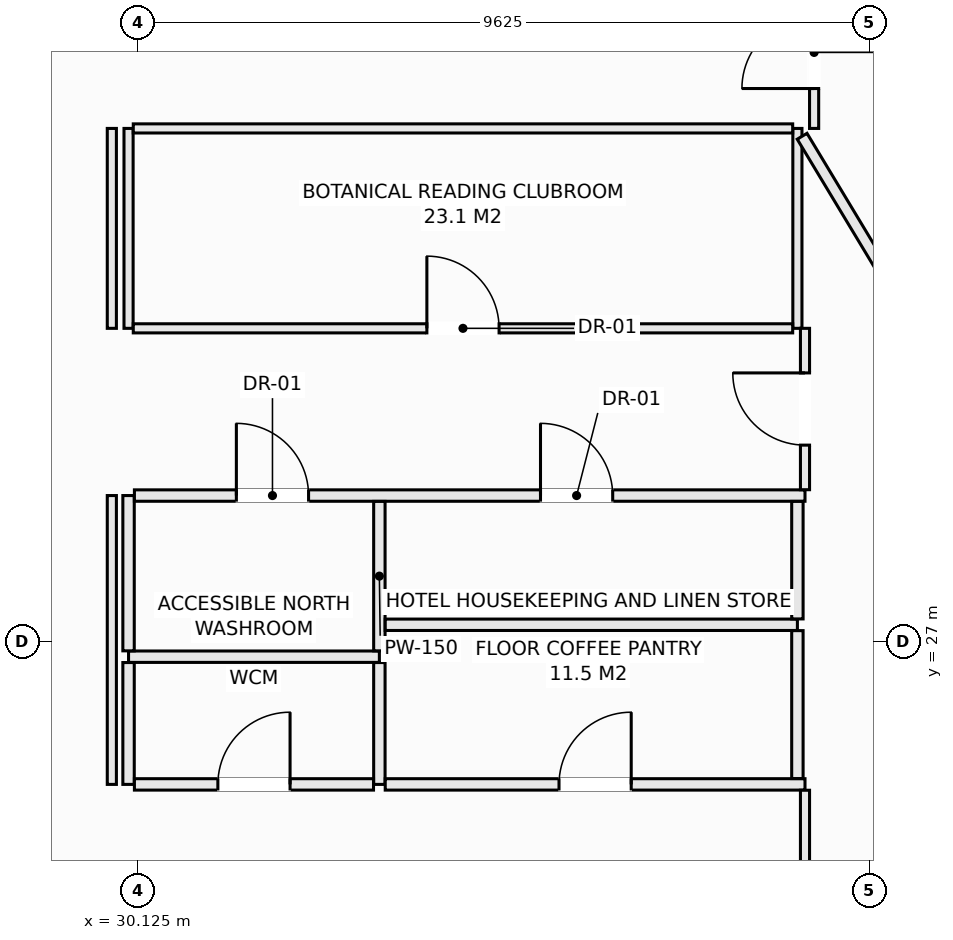
"""IFC4 building model, lengths in metres.
Left out: names, types, materials, properties, quantities, classifications, styles, units other than length and angle.
Written with IfcOpenShell. Run it as: python <this file> out.ifc"""

import sys

from ifc_helpers import new_model, si_unit, direction, frame, frame_2d, origin, place, context, subcontext, project, spatial, rectangle, extrude, element, fill, save


model = new_model("IFC4")
c1 = context("Model", 3, precision=1e-05, world=origin(), true_north=direction((0.0, 1.0)))
c2 = subcontext(c1, "Body", "Model", "MODEL_VIEW")
j1 = project(units=[si_unit("LENGTHUNIT", "METRE"), si_unit("PLANEANGLEUNIT", "RADIAN")], contexts=[c1])
p1 = place(None, origin())
s1 = spatial("IfcSite", under=j1, at=p1, CompositionType="ELEMENT")
p2 = place(p1, origin())
s2 = spatial("IfcBuilding", under=s1, at=p2, CompositionType="ELEMENT")
p3 = place(p2, frame((0.0, 0.0, 139.3)))
s3 = spatial("IfcBuildingStorey", under=s2, at=p3, CompositionType="ELEMENT", Elevation=139.3)
p4 = place(p3, frame((30.0, 26.8, 0.0), z_axis=(0.0, 0.0, 1.0), x_axis=(1.0, 0.0, 0.0)))
e1 = element("IfcWall", 1, at=p4, inside=s3, PredefinedType="PARTITIONING", context=c2, shape_type="SweptSolid", body=[
    extrude(rectangle(XDim=3.3, YDim=0.15, at=frame_2d((1.65, 0.0))), origin(), (0.0, 0.0, 1.0), 3.13),
])
p5 = place(p3, frame((30.0, 25.12, 0.0), z_axis=(0.0, 0.0, 1.0), x_axis=(0.0, 1.0, 0.0)))
e2 = element("IfcWall", 2, at=p5, inside=s3, PredefinedType="PARTITIONING", context=c2, shape_type="SweptSolid", body=[
    extrude(rectangle(XDim=1.603, YDim=0.15, at=frame_2d((0.801, 0.0))), origin(), (0.0, 0.0, 1.0), 3.13),
])
p6 = place(p3, frame((30.0, 26.877, 0.0), z_axis=(0.0, 0.0, 1.0), x_axis=(0.0, 1.0, 0.0)))
e3 = element("IfcWall", 3, at=p6, inside=s3, PredefinedType="PARTITIONING", context=c2, shape_type="SweptSolid", body=[
    extrude(rectangle(XDim=2.043, YDim=0.15, at=frame_2d((1.021, 0.0))), origin(), (0.0, 0.0, 1.0), 3.13),
])
p7 = place(p3, frame((30.0, 31.12, 0.0), z_axis=(0.0, 0.0, 1.0), x_axis=(0.0, 1.0, 0.0)))
e4 = element("IfcWall", 4, at=p7, inside=s3, PredefinedType="PARTITIONING", context=c2, shape_type="SweptSolid", body=[
    extrude(rectangle(XDim=2.63, YDim=0.12, at=frame_2d((1.315, 0.0))), origin(), (0.0, 0.0, 1.0), 3.13),
])
p8 = place(p3, frame((30.077, 28.92, 0.0), z_axis=(0.0, 0.0, 1.0), x_axis=(1.0, 0.0, 0.0)))
e5 = element("IfcWall", 5, at=p8, inside=s3, PredefinedType="PARTITIONING", context=c2, shape_type="SweptSolid", body=[
    extrude(rectangle(XDim=8.823, YDim=0.15, at=frame_2d((4.412, 0.0))), origin(), (0.0, 0.0, 1.0), 3.13),
])
p9 = place(p8, frame((1.342, 0.0, 0.0)))
e6 = element("IfcOpeningElement", 6, at=p9, cuts=e5, PredefinedType="OPENING", context=c2, shape_type="SweptSolid", body=[
    extrude(rectangle(XDim=0.95, YDim=2.1, at=frame_2d((0.475, 1.05))), frame((0.0, 0.085, 0.0), z_axis=(0.0, -1.0, 0.0), x_axis=(1.0, 0.0, 0.0)), (0.0, 0.0, 1.0), 0.17),
])
p10 = place(p8, frame((5.343, 0.0, 0.0)))
e7 = element("IfcOpeningElement", 7, at=p10, cuts=e5, PredefinedType="OPENING", context=c2, shape_type="SweptSolid", body=[
    extrude(rectangle(XDim=0.95, YDim=2.1, at=frame_2d((0.475, 1.05))), frame((0.0, 0.085, 0.0), z_axis=(0.0, -1.0, 0.0), x_axis=(1.0, 0.0, 0.0)), (0.0, 0.0, 1.0), 0.17),
])
p11 = place(p3, frame((33.3, 25.12, 0.0), z_axis=(0.0, 0.0, 1.0), x_axis=(0.0, 1.0, 0.0)))
e8 = element("IfcWall", 8, at=p11, inside=s3, PredefinedType="PARTITIONING", context=c2, shape_type="SweptSolid", body=[
    extrude(rectangle(XDim=1.603, YDim=0.15, at=frame_2d((0.801, 0.0))), origin(), (0.0, 0.0, 1.0), 3.13),
])
p12 = place(p3, frame((33.3, 26.877, 0.0), z_axis=(0.0, 0.0, 1.0), x_axis=(0.0, 1.0, 0.0)))
e9 = element("IfcWall", 9, at=p12, inside=s3, PredefinedType="PARTITIONING", context=c2, shape_type="SweptSolid", body=[
    extrude(rectangle(XDim=1.966, YDim=0.15, at=frame_2d((0.983, 0.0))), origin(), (0.0, 0.0, 1.0), 3.13),
])
p13 = place(p3, frame((30.077, 25.12, 0.0), z_axis=(0.0, 0.0, 1.0), x_axis=(1.0, 0.0, 0.0)))
e10 = element("IfcWall", 10, at=p13, inside=s3, PredefinedType="PARTITIONING", context=c2, shape_type="SweptSolid", body=[
    extrude(rectangle(XDim=3.146, YDim=0.15, at=frame_2d((1.573, 0.0))), origin(), (0.0, 0.0, 1.0), 3.13),
])
p14 = place(p13, frame((1.098, 0.0, 0.0)))
e11 = element("IfcOpeningElement", 11, at=p14, cuts=e10, PredefinedType="OPENING", context=c2, shape_type="SweptSolid", body=[
    extrude(rectangle(XDim=0.95, YDim=2.1, at=frame_2d((0.475, 1.05))), frame((0.0, 0.085, 0.0), z_axis=(0.0, -1.0, 0.0), x_axis=(1.0, 0.0, 0.0)), (0.0, 0.0, 1.0), 0.17),
])
p15 = place(p3, frame((33.377, 25.12, 0.0), z_axis=(0.0, 0.0, 1.0), x_axis=(1.0, 0.0, 0.0)))
e12 = element("IfcWall", 12, at=p15, inside=s3, PredefinedType="PARTITIONING", context=c2, shape_type="SweptSolid", body=[
    extrude(rectangle(XDim=5.523, YDim=0.15, at=frame_2d((2.761, 0.0))), origin(), (0.0, 0.0, 1.0), 3.13),
])
p16 = place(p15, frame((2.287, 0.0, 0.0)))
e13 = element("IfcOpeningElement", 13, at=p16, cuts=e12, PredefinedType="OPENING", context=c2, shape_type="SweptSolid", body=[
    extrude(rectangle(XDim=0.95, YDim=2.1, at=frame_2d((0.475, 1.05))), frame((0.0, 0.085, 0.0), z_axis=(0.0, -1.0, 0.0), x_axis=(1.0, 0.0, 0.0)), (0.0, 0.0, 1.0), 0.17),
])
p17 = place(p3, frame((33.377, 27.22, 0.0), z_axis=(0.0, 0.0, 1.0), x_axis=(1.0, 0.0, 0.0)))
e14 = element("IfcWall", 14, at=p17, inside=s3, PredefinedType="PARTITIONING", context=c2, shape_type="SweptSolid", body=[
    extrude(rectangle(XDim=5.423, YDim=0.15, at=frame_2d((2.711, 0.0))), origin(), (0.0, 0.0, 1.0), 3.13),
])
p18 = place(p3, frame((38.8, 25.197, 0.0), z_axis=(0.0, 0.0, 1.0), x_axis=(0.0, 1.0, 0.0)))
e15 = element("IfcWall", 15, at=p18, inside=s3, PredefinedType="PARTITIONING", context=c2, shape_type="SweptSolid", body=[
    extrude(rectangle(XDim=1.946, YDim=0.15, at=frame_2d((0.973, 0.0))), origin(), (0.0, 0.0, 1.0), 3.13),
])
p19 = place(p3, frame((38.8, 27.297, 0.0), z_axis=(0.0, 0.0, 1.0), x_axis=(0.0, 1.0, 0.0)))
e16 = element("IfcWall", 16, at=p19, inside=s3, PredefinedType="PARTITIONING", context=c2, shape_type="SweptSolid", body=[
    extrude(rectangle(XDim=1.546, YDim=0.15, at=frame_2d((0.773, 0.0))), origin(), (0.0, 0.0, 1.0), 3.13),
])
p20 = place(p3, frame((38.8, 31.12, 0.0), z_axis=(0.0, 0.0, 1.0), x_axis=(0.0, 1.0, 0.0)))
e17 = element("IfcWall", 17, at=p20, inside=s3, PredefinedType="PARTITIONING", context=c2, shape_type="SweptSolid", body=[
    extrude(rectangle(XDim=2.63, YDim=0.12, at=frame_2d((1.315, 0.0))), origin(), (0.0, 0.0, 1.0), 3.13),
])
p21 = place(p3, frame((30.062, 31.12, 0.0), z_axis=(0.0, 0.0, 1.0), x_axis=(1.0, 0.0, 0.0)))
e18 = element("IfcWall", 18, at=p21, inside=s3, PredefinedType="PARTITIONING", context=c2, shape_type="SweptSolid", body=[
    extrude(rectangle(XDim=8.676, YDim=0.12, at=frame_2d((4.338, 0.0))), origin(), (0.0, 0.0, 1.0), 3.13),
])
p22 = place(p21, frame((3.863, 0.0, 0.0)))
e19 = element("IfcOpeningElement", 19, at=p22, cuts=e18, PredefinedType="OPENING", context=c2, shape_type="SweptSolid", body=[
    extrude(rectangle(XDim=0.95, YDim=2.1, at=frame_2d((0.475, 1.05))), frame((0.0, 0.07, 0.0), z_axis=(0.0, -1.0, 0.0), x_axis=(1.0, 0.0, 0.0)), (0.0, 0.0, 1.0), 0.14),
])
p23 = place(p3, frame((30.062, 33.75, 0.0), z_axis=(0.0, 0.0, 1.0), x_axis=(1.0, 0.0, 0.0)))
e20 = element("IfcWall", 20, at=p23, inside=s3, PredefinedType="PARTITIONING", context=c2, shape_type="SweptSolid", body=[
    extrude(rectangle(XDim=8.676, YDim=0.12, at=frame_2d((4.338, 0.0))), origin(), (0.0, 0.0, 1.0), 3.13),
])
p24 = place(p3, frame((39.02, 33.75, 0.0), z_axis=(0.0, 0.0, 1.0), x_axis=(0.0, 1.0, 0.0)))
e21 = element("IfcWall", 21, at=p24, inside=s3, PredefinedType="PARTITIONING", context=c2, shape_type="SweptSolid", body=[
    extrude(rectangle(XDim=2.0, YDim=0.12, at=frame_2d((1.0, 0.0))), origin(), (0.0, 0.0, 1.0), 3.13),
])
p25 = place(p24, frame((0.525, 0.0, 0.0)))
e22 = element("IfcOpeningElement", 22, at=p25, cuts=e21, PredefinedType="OPENING", context=c2, shape_type="SweptSolid", body=[
    extrude(rectangle(XDim=0.95, YDim=2.1, at=frame_2d((0.475, 1.05))), frame((0.0, 0.07, 0.0), z_axis=(0.0, -1.0, 0.0), x_axis=(1.0, 0.0, 0.0)), (0.0, 0.0, 1.0), 0.14),
])
p26 = place(p3, frame((29.78, 25.12, 0.0), z_axis=(0.0, 0.0, 1.0), x_axis=(0.0, 1.0, 0.0)))
e23 = element("IfcWall", 23, at=p26, inside=s3, PredefinedType="PARTITIONING", context=c2, shape_type="SweptSolid", body=[
    extrude(rectangle(XDim=3.8, YDim=0.12, at=frame_2d((1.9, 0.0))), origin(), (0.0, 0.0, 1.0), 3.13),
])
p27 = place(p3, frame((29.78, 31.12, 0.0), z_axis=(0.0, 0.0, 1.0), x_axis=(0.0, 1.0, 0.0)))
e24 = element("IfcWall", 24, at=p27, inside=s3, PredefinedType="PARTITIONING", context=c2, shape_type="SweptSolid", body=[
    extrude(rectangle(XDim=2.63, YDim=0.12, at=frame_2d((1.315, 0.0))), origin(), (0.0, 0.0, 1.0), 3.13),
])
p28 = place(p3, frame((38.9, 23.02, 0.0), z_axis=(0.0, 0.0, 1.0), x_axis=(0.0, 1.0, 0.0)))
e25 = element("IfcWall", 25, at=p28, inside=s3, PredefinedType="PARTITIONING", context=c2, shape_type="SweptSolid", body=[
    extrude(rectangle(XDim=2.023, YDim=0.12, at=frame_2d((1.011, 0.0))), origin(), (0.0, 0.0, 1.0), 3.13),
])
p29 = place(p3, frame((38.9, 28.997, 0.0), z_axis=(0.0, 0.0, 1.0), x_axis=(0.0, 1.0, 0.0)))
e26 = element("IfcWall", 26, at=p29, inside=s3, PredefinedType="PARTITIONING", context=c2, shape_type="SweptSolid", body=[
    extrude(rectangle(XDim=2.123, YDim=0.12, at=frame_2d((1.062, 0.0))), origin(), (0.0, 0.0, 1.0), 3.13),
])
p30 = place(p29, frame((0.586, 0.0, 0.0)))
e27 = element("IfcOpeningElement", 27, at=p30, cuts=e26, PredefinedType="OPENING", context=c2, shape_type="SweptSolid", body=[
    extrude(rectangle(XDim=0.95, YDim=2.1, at=frame_2d((0.475, 1.05))), frame((0.0, 0.07, 0.0), z_axis=(0.0, -1.0, 0.0), x_axis=(1.0, 0.0, 0.0)), (0.0, 0.0, 1.0), 0.14),
])
p31 = place(p3, frame((38.862, 33.647, 0.0), z_axis=(0.0, 0.0, 1.0), x_axis=(0.516075497247, -0.856543099407, 0.0)))
e28 = element("IfcWall", 28, at=p31, inside=s3, PredefinedType="PARTITIONING", context=c2, shape_type="SweptSolid", body=[
    extrude(rectangle(XDim=19.534, YDim=0.15, at=frame_2d((9.767, 0.0))), origin(), (0.0, 0.0, 1.0), 1.922),
])
p32 = place(p3, frame((35.479, 40.488, 0.0), z_axis=(0.0, 0.0, 1.0), x_axis=(0.636055982797, -0.771642914014, 0.0)))
e29 = element("IfcWall", 29, at=p32, inside=s3, PredefinedType="PARTITIONING", context=c2, shape_type="SweptSolid", body=[
    extrude(rectangle(XDim=26.473, YDim=0.12, at=frame_2d((13.236, 0.0))), origin(), (0.0, 0.0, 1.0), 2.812),
])
p33 = place(p9, origin())
e30 = element("IfcDoor", 30, at=p33, inside=s3, OperationType="SINGLE_SWING_LEFT", PredefinedType="DOOR", context=c2, shape_type="SweptSolid", body=[
    extrude(rectangle(XDim=0.95, YDim=2.1, at=frame_2d((0.475, 1.05))), frame((0.0, 0.025, 0.0), z_axis=(0.0, -1.0, 0.0), x_axis=(1.0, 0.0, 0.0)), (0.0, 0.0, 1.0), 0.05),
])
fill(e6, e30)
p34 = place(p14, origin())
e31 = element("IfcDoor", 31, at=p34, inside=s3, OperationType="SINGLE_SWING_RIGHT", PredefinedType="DOOR", context=c2, shape_type="SweptSolid", body=[
    extrude(rectangle(XDim=0.95, YDim=2.1, at=frame_2d((0.475, 1.05))), frame((0.0, 0.025, 0.0), z_axis=(0.0, -1.0, 0.0), x_axis=(1.0, 0.0, 0.0)), (0.0, 0.0, 1.0), 0.05),
])
fill(e11, e31)
p35 = place(p10, origin())
e32 = element("IfcDoor", 32, at=p35, inside=s3, OperationType="SINGLE_SWING_LEFT", PredefinedType="DOOR", context=c2, shape_type="SweptSolid", body=[
    extrude(rectangle(XDim=0.95, YDim=2.1, at=frame_2d((0.475, 1.05))), frame((0.0, 0.025, 0.0), z_axis=(0.0, -1.0, 0.0), x_axis=(1.0, 0.0, 0.0)), (0.0, 0.0, 1.0), 0.05),
])
fill(e7, e32)
p36 = place(p16, origin())
e33 = element("IfcDoor", 33, at=p36, inside=s3, OperationType="SINGLE_SWING_RIGHT", PredefinedType="DOOR", context=c2, shape_type="SweptSolid", body=[
    extrude(rectangle(XDim=0.95, YDim=2.1, at=frame_2d((0.475, 1.05))), frame((0.0, 0.025, 0.0), z_axis=(0.0, -1.0, 0.0), x_axis=(1.0, 0.0, 0.0)), (0.0, 0.0, 1.0), 0.05),
])
fill(e13, e33)
p37 = place(p22, origin())
e34 = element("IfcDoor", 34, at=p37, inside=s3, OperationType="SINGLE_SWING_LEFT", PredefinedType="DOOR", context=c2, shape_type="SweptSolid", body=[
    extrude(rectangle(XDim=0.95, YDim=2.1, at=frame_2d((0.475, 1.05))), frame((0.0, 0.025, 0.0), z_axis=(0.0, -1.0, 0.0), x_axis=(1.0, 0.0, 0.0)), (0.0, 0.0, 1.0), 0.05),
])
fill(e19, e34)
p38 = place(p30, origin())
e35 = element("IfcDoor", 35, at=p38, inside=s3, OperationType="SINGLE_SWING_RIGHT", PredefinedType="DOOR", context=c2, shape_type="SweptSolid", body=[
    extrude(rectangle(XDim=0.95, YDim=2.1, at=frame_2d((0.475, 1.05))), frame((0.0, 0.025, 0.0), z_axis=(0.0, -1.0, 0.0), x_axis=(1.0, 0.0, 0.0)), (0.0, 0.0, 1.0), 0.05),
])
fill(e27, e35)
p39 = place(p25, origin())
e36 = element("IfcDoor", 36, at=p39, inside=s3, OperationType="SINGLE_SWING_LEFT", PredefinedType="DOOR", context=c2, shape_type="SweptSolid", body=[
    extrude(rectangle(XDim=0.95, YDim=2.1, at=frame_2d((0.475, 1.05))), frame((0.0, 0.025, 0.0), z_axis=(0.0, -1.0, 0.0), x_axis=(1.0, 0.0, 0.0)), (0.0, 0.0, 1.0), 0.05),
])
fill(e22, e36)
save(model, sys.argv[1])
